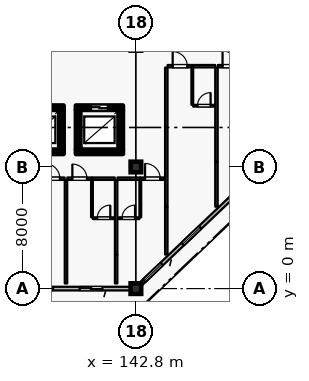
"""IFC4 building model, lengths in metres.
Left out: names, types, materials, properties, quantities, classifications, styles, units other than length and angle.
Written with IfcOpenShell. Run it as: python <this file> out.ifc"""

import sys

from ifc_helpers import new_model, si_unit, direction, frame, frame_2d, origin, origin_2d, place, context, subcontext, project, spatial, rectangle, extrude, element, fill, save


model = new_model("IFC4")
c1 = context("Model", 3, precision=1e-05, world=origin(), true_north=direction((0.0, 1.0)))
c2 = subcontext(c1, "Body", "Model", "MODEL_VIEW")
j1 = project(units=[si_unit("LENGTHUNIT", "METRE"), si_unit("PLANEANGLEUNIT", "RADIAN")], contexts=[c1])
p1 = place(None, origin())
s1 = spatial("IfcSite", under=j1, at=p1, CompositionType="ELEMENT")
p2 = place(p1, origin())
s2 = spatial("IfcBuilding", under=s1, at=p2, CompositionType="ELEMENT")
p3 = place(p2, frame((0.0, 0.0, 28.8)))
s3 = spatial("IfcBuildingStorey", under=s2, at=p3, CompositionType="ELEMENT", Elevation=28.8)
for number, where, z_axis, x_axis in (
    (1, (142.8, 0.0, 0.0), (0.0, 0.0, 1.0), (1.0, 0.0, 0.0)),
    (2, (142.8, 8.0, 0.0), (0.0, 0.0, 1.0), (1.0, 0.0, 0.0)),
):
    element("IfcColumn", number, at=place(p3, frame(where, z_axis=z_axis, x_axis=x_axis)), inside=s3, PredefinedType="COLUMN", context=c2, shape_type="SweptSolid", body=[
        extrude(rectangle(XDim=0.7, YDim=0.7, at=origin_2d()), origin(), (0.0, 0.0, 1.0), 3.6),
    ])
p4 = place(p3, frame((142.45, 0.0, 0.0), z_axis=(0.0, 0.0, 1.0), x_axis=(-1.0, 0.0, 0.0)))
e3 = element("IfcWall", 3, at=p4, inside=s3, PredefinedType="SOLIDWALL", context=c2, shape_type="SweptSolid", body=[
    extrude(rectangle(XDim=7.7, YDim=0.24, at=frame_2d((3.85, 0.0))), origin(), (0.0, 0.0, 1.0), 2.93),
])
p5 = place(p4, frame((1.85, 0.0, 0.0)))
e4 = element("IfcOpeningElement", 4, at=p5, cuts=e3, PredefinedType="OPENING", context=c2, shape_type="SweptSolid", body=[
    extrude(rectangle(XDim=1.5, YDim=2.25, at=frame_2d((0.75, 1.125))), frame((0.0, 0.13, 0.0), z_axis=(0.0, -1.0, 0.0), x_axis=(1.0, 0.0, 0.0)), (0.0, 0.0, 1.0), 0.26),
])
p6 = place(p4, frame((5.1, 0.0, 0.8)))
e5 = element("IfcOpeningElement", 5, at=p6, cuts=e3, PredefinedType="OPENING", context=c2, shape_type="SweptSolid", body=[
    extrude(rectangle(XDim=1.6, YDim=1.6, at=frame_2d((0.8, 0.8))), frame((0.0, 0.13, 0.0), z_axis=(0.0, -1.0, 0.0), x_axis=(1.0, 0.0, 0.0)), (0.0, 0.0, 1.0), 0.26),
])
p7 = place(p3, frame((150.85, 7.667, 0.0), z_axis=(0.0, 0.0, 1.0), x_axis=(-0.724116091282, -0.689678103427, 0.0)))
e6 = element("IfcWall", 6, at=p7, inside=s3, PredefinedType="SOLIDWALL", context=c2, shape_type="SweptSolid", body=[
    extrude(rectangle(XDim=10.634, YDim=0.24, at=frame_2d((5.317, 0.0))), origin(), (0.0, 0.0, 1.0), 2.93),
])
p8 = place(p7, frame((1.08, 0.0, 0.0)))
e7 = element("IfcOpeningElement", 7, at=p8, cuts=e6, PredefinedType="OPENING", context=c2, shape_type="SweptSolid", body=[
    extrude(rectangle(XDim=1.5, YDim=2.25, at=frame_2d((0.75, 1.125))), frame((0.0, 0.13, 0.0), z_axis=(0.0, -1.0, 0.0), x_axis=(1.0, 0.0, 0.0)), (0.0, 0.0, 1.0), 0.26),
])
p9 = place(p7, frame((5.276, 0.0, 0.8)))
e8 = element("IfcOpeningElement", 8, at=p9, cuts=e6, PredefinedType="OPENING", context=c2, shape_type="SweptSolid", body=[
    extrude(rectangle(XDim=1.6, YDim=1.6, at=frame_2d((0.8, 0.8))), frame((0.0, 0.13, 0.0), z_axis=(0.0, -1.0, 0.0), x_axis=(1.0, 0.0, 0.0)), (0.0, 0.0, 1.0), 0.26),
])
p10 = place(p7, frame((8.764, 0.0, 0.8)))
e9 = element("IfcOpeningElement", 9, at=p10, cuts=e6, PredefinedType="OPENING", context=c2, shape_type="SweptSolid", body=[
    extrude(rectangle(XDim=1.6, YDim=1.6, at=frame_2d((0.8, 0.8))), frame((0.0, 0.13, 0.0), z_axis=(0.0, -1.0, 0.0), x_axis=(1.0, 0.0, 0.0)), (0.0, 0.0, 1.0), 0.26),
])
p11 = place(p3, frame((134.95, 9.0, 0.0), z_axis=(0.0, 0.0, 1.0), x_axis=(1.0, 0.0, 0.0)))
e10 = element("IfcWall", 10, at=p11, inside=s3, PredefinedType="SHEAR", context=c2, shape_type="SweptSolid", body=[
    extrude(rectangle(XDim=3.1, YDim=0.3, at=frame_2d((1.55, 0.0))), origin(), (0.0, 0.0, 1.0), 3.365),
])
p12 = place(p3, frame((137.9, 9.155, 0.0), z_axis=(0.0, 0.0, 1.0), x_axis=(0.0, 1.0, 0.0)))
e11 = element("IfcWall", 11, at=p12, inside=s3, PredefinedType="SHEAR", context=c2, shape_type="SweptSolid", body=[
    extrude(rectangle(XDim=2.59, YDim=0.3, at=frame_2d((1.295, 0.0))), origin(), (0.0, 0.0, 1.0), 3.365),
])
p13 = place(p3, frame((138.05, 11.9, 0.0), z_axis=(0.0, 0.0, 1.0), x_axis=(-1.0, 0.0, 0.0)))
e12 = element("IfcWall", 12, at=p13, inside=s3, PredefinedType="SHEAR", context=c2, shape_type="SweptSolid", body=[
    extrude(rectangle(XDim=3.1, YDim=0.3, at=frame_2d((1.55, 0.0))), origin(), (0.0, 0.0, 1.0), 3.365),
])
p14 = place(p13, frame((1.0, 0.0, 0.0)))
e13 = element("IfcOpeningElement", 13, at=p14, cuts=e12, PredefinedType="OPENING", context=c2, shape_type="SweptSolid", body=[
    extrude(rectangle(XDim=1.1, YDim=2.2, at=frame_2d((0.55, 1.1))), frame((0.0, 0.16, 0.0), z_axis=(0.0, -1.0, 0.0), x_axis=(1.0, 0.0, 0.0)), (0.0, 0.0, 1.0), 0.32),
])
p15 = place(p3, frame((138.85, 9.0, 0.0), z_axis=(0.0, 0.0, 1.0), x_axis=(1.0, 0.0, 0.0)))
e14 = element("IfcWall", 14, at=p15, inside=s3, PredefinedType="SHEAR", context=c2, shape_type="SweptSolid", body=[
    extrude(rectangle(XDim=3.1, YDim=0.3, at=frame_2d((1.55, 0.0))), origin(), (0.0, 0.0, 1.0), 3.365),
])
p16 = place(p3, frame((141.8, 9.155, 0.0), z_axis=(0.0, 0.0, 1.0), x_axis=(0.0, 1.0, 0.0)))
e15 = element("IfcWall", 15, at=p16, inside=s3, PredefinedType="SHEAR", context=c2, shape_type="SweptSolid", body=[
    extrude(rectangle(XDim=2.59, YDim=0.3, at=frame_2d((1.295, 0.0))), origin(), (0.0, 0.0, 1.0), 3.365),
])
p17 = place(p3, frame((141.95, 11.9, 0.0), z_axis=(0.0, 0.0, 1.0), x_axis=(-1.0, 0.0, 0.0)))
e16 = element("IfcWall", 16, at=p17, inside=s3, PredefinedType="SHEAR", context=c2, shape_type="SweptSolid", body=[
    extrude(rectangle(XDim=3.1, YDim=0.3, at=frame_2d((1.55, 0.0))), origin(), (0.0, 0.0, 1.0), 3.365),
])
p18 = place(p17, frame((1.0, 0.0, 0.0)))
e17 = element("IfcOpeningElement", 17, at=p18, cuts=e16, PredefinedType="OPENING", context=c2, shape_type="SweptSolid", body=[
    extrude(rectangle(XDim=1.1, YDim=2.2, at=frame_2d((0.55, 1.1))), frame((0.0, 0.16, 0.0), z_axis=(0.0, -1.0, 0.0), x_axis=(1.0, 0.0, 0.0)), (0.0, 0.0, 1.0), 0.32),
])
p19 = place(p3, frame((139.0, 11.745, 0.0), z_axis=(0.0, 0.0, 1.0), x_axis=(0.0, -1.0, 0.0)))
e18 = element("IfcWall", 18, at=p19, inside=s3, PredefinedType="SHEAR", context=c2, shape_type="SweptSolid", body=[
    extrude(rectangle(XDim=2.59, YDim=0.3, at=frame_2d((1.295, 0.0))), origin(), (0.0, 0.0, 1.0), 3.365),
])
p20 = place(p3, frame((136.49, 7.23, 0.0), z_axis=(0.0, 0.0, 1.0), x_axis=(1.0, 0.0, 0.0)))
e19 = element("IfcWall", 19, at=p20, inside=s3, PredefinedType="PARTITIONING", context=c2, shape_type="SweptSolid", body=[
    extrude(rectangle(XDim=1.62, YDim=0.16, at=frame_2d((0.81, 0.0))), origin(), (0.0, 0.0, 1.0), 3.365),
])
p21 = place(p20, frame((0.31, 0.0, 0.0)))
e20 = element("IfcOpeningElement", 20, at=p21, cuts=e19, PredefinedType="OPENING", context=c2, shape_type="SweptSolid", body=[
    extrude(rectangle(XDim=1.0, YDim=2.25, at=frame_2d((0.5, 1.125))), frame((0.0, 0.09, 0.0), z_axis=(0.0, -1.0, 0.0), x_axis=(1.0, 0.0, 0.0)), (0.0, 0.0, 1.0), 0.18),
])
p22 = place(p3, frame((138.29, 7.23, 0.0), z_axis=(0.0, 0.0, 1.0), x_axis=(1.0, 0.0, 0.0)))
e21 = element("IfcWall", 21, at=p22, inside=s3, PredefinedType="PARTITIONING", context=c2, shape_type="SweptSolid", body=[
    extrude(rectangle(XDim=1.62, YDim=0.16, at=frame_2d((0.81, 0.0))), origin(), (0.0, 0.0, 1.0), 3.365),
])
p23 = place(p22, frame((0.33, 0.0, 0.0)))
e22 = element("IfcOpeningElement", 22, at=p23, cuts=e21, PredefinedType="OPENING", context=c2, shape_type="SweptSolid", body=[
    extrude(rectangle(XDim=0.96, YDim=2.2, at=frame_2d((0.48, 1.1))), frame((0.0, 0.09, 0.0), z_axis=(0.0, -1.0, 0.0), x_axis=(1.0, 0.0, 0.0)), (0.0, 0.0, 1.0), 0.18),
])
p24 = place(p3, frame((139.92, 7.23, 0.0), z_axis=(0.0, 0.0, 1.0), x_axis=(1.0, 0.0, 0.0)))
e23 = element("IfcWall", 23, at=p24, inside=s3, PredefinedType="PARTITIONING", context=c2, shape_type="SweptSolid", body=[
    extrude(rectangle(XDim=1.49, YDim=0.16, at=frame_2d((0.745, 0.0))), origin(), (0.0, 0.0, 1.0), 3.365),
])
p25 = place(p3, frame((139.91, 4.69, 0.0), z_axis=(0.0, 0.0, 1.0), x_axis=(0.0, 1.0, 0.0)))
e24 = element("IfcWall", 24, at=p25, inside=s3, PredefinedType="PARTITIONING", context=c2, shape_type="SweptSolid", body=[
    extrude(rectangle(XDim=2.45, YDim=0.115, at=frame_2d((1.225, 0.0))), origin(), (0.0, 0.0, 1.0), 3.365),
])
p26 = place(p3, frame((139.97, 4.63, 0.0), z_axis=(0.0, 0.0, 1.0), x_axis=(1.0, 0.0, 0.0)))
e25 = element("IfcWall", 25, at=p26, inside=s3, PredefinedType="PARTITIONING", context=c2, shape_type="SweptSolid", body=[
    extrude(rectangle(XDim=1.43, YDim=0.115, at=frame_2d((0.715, 0.0))), origin(), (0.0, 0.0, 1.0), 3.365),
])
p27 = place(p26, frame((0.285, 0.0, 0.0)))
e26 = element("IfcOpeningElement", 26, at=p27, cuts=e25, PredefinedType="OPENING", context=c2, shape_type="SweptSolid", body=[
    extrude(rectangle(XDim=0.86, YDim=2.12, at=frame_2d((0.43, 1.06))), frame((0.0, 0.067, 0.0), z_axis=(0.0, -1.0, 0.0), x_axis=(1.0, 0.0, 0.0)), (0.0, 0.0, 1.0), 0.135),
])
p28 = place(p3, frame((138.2, 0.34, 0.0), z_axis=(0.0, 0.0, 1.0), x_axis=(0.0, 1.0, 0.0)))
e27 = element("IfcWall", 27, at=p28, inside=s3, PredefinedType="PARTITIONING", context=c2, shape_type="SweptSolid", body=[
    extrude(rectangle(XDim=6.8, YDim=0.16, at=frame_2d((3.4, 0.0))), origin(), (0.0, 0.0, 1.0), 3.365),
])
p29 = place(p3, frame((141.5, 0.34, 0.0), z_axis=(0.0, 0.0, 1.0), x_axis=(0.0, 1.0, 0.0)))
e28 = element("IfcWall", 28, at=p29, inside=s3, PredefinedType="PARTITIONING", context=c2, shape_type="SweptSolid", body=[
    extrude(rectangle(XDim=1.89, YDim=0.16, at=frame_2d((0.945, 0.0))), origin(), (0.0, 0.0, 1.0), 3.365),
])
p30 = place(p3, frame((141.59, 7.23, 0.0), z_axis=(0.0, 0.0, 1.0), x_axis=(1.0, 0.0, 0.0)))
e29 = element("IfcWall", 29, at=p30, inside=s3, PredefinedType="PARTITIONING", context=c2, shape_type="SweptSolid", body=[
    extrude(rectangle(XDim=1.49, YDim=0.16, at=frame_2d((0.745, 0.0))), origin(), (0.0, 0.0, 1.0), 3.365),
])
p31 = place(p3, frame((143.09, 7.23, 0.0), z_axis=(0.0, 0.0, 1.0), x_axis=(1.0, 0.0, 0.0)))
e30 = element("IfcWall", 30, at=p31, inside=s3, PredefinedType="PARTITIONING", context=c2, shape_type="SweptSolid", body=[
    extrude(rectangle(XDim=1.62, YDim=0.16, at=frame_2d((0.81, 0.0))), origin(), (0.0, 0.0, 1.0), 3.365),
])
p32 = place(p31, frame((0.31, 0.0, 0.0)))
e31 = element("IfcOpeningElement", 31, at=p32, cuts=e30, PredefinedType="OPENING", context=c2, shape_type="SweptSolid", body=[
    extrude(rectangle(XDim=1.0, YDim=2.25, at=frame_2d((0.5, 1.125))), frame((0.0, 0.09, 0.0), z_axis=(0.0, -1.0, 0.0), x_axis=(1.0, 0.0, 0.0)), (0.0, 0.0, 1.0), 0.18),
])
p33 = place(p3, frame((143.09, 4.69, 0.0), z_axis=(0.0, 0.0, 1.0), x_axis=(0.0, 1.0, 0.0)))
e32 = element("IfcWall", 32, at=p33, inside=s3, PredefinedType="PARTITIONING", context=c2, shape_type="SweptSolid", body=[
    extrude(rectangle(XDim=2.45, YDim=0.115, at=frame_2d((1.225, 0.0))), origin(), (0.0, 0.0, 1.0), 3.365),
])
p34 = place(p3, frame((141.6, 4.63, 0.0), z_axis=(0.0, 0.0, 1.0), x_axis=(1.0, 0.0, 0.0)))
e33 = element("IfcWall", 33, at=p34, inside=s3, PredefinedType="PARTITIONING", context=c2, shape_type="SweptSolid", body=[
    extrude(rectangle(XDim=1.43, YDim=0.115, at=frame_2d((0.715, 0.0))), origin(), (0.0, 0.0, 1.0), 3.365),
])
p35 = place(p34, frame((0.285, 0.0, 0.0)))
e34 = element("IfcOpeningElement", 34, at=p35, cuts=e33, PredefinedType="OPENING", context=c2, shape_type="SweptSolid", body=[
    extrude(rectangle(XDim=0.86, YDim=2.12, at=frame_2d((0.43, 1.06))), frame((0.0, 0.067, 0.0), z_axis=(0.0, -1.0, 0.0), x_axis=(1.0, 0.0, 0.0)), (0.0, 0.0, 1.0), 0.135),
])
p36 = place(p3, frame((141.5, 2.24, 0.0), z_axis=(0.0, 0.0, 1.0), x_axis=(0.0, 1.0, 0.0)))
e35 = element("IfcWall", 35, at=p36, inside=s3, PredefinedType="PARTITIONING", context=c2, shape_type="SweptSolid", body=[
    extrude(rectangle(XDim=4.9, YDim=0.16, at=frame_2d((2.45, 0.0))), origin(), (0.0, 0.0, 1.0), 3.365),
])
p37 = place(p3, frame((144.8, 2.24, 0.0), z_axis=(0.0, 0.0, 1.0), x_axis=(0.0, 1.0, 0.0)))
e36 = element("IfcWall", 36, at=p37, inside=s3, PredefinedType="PARTITIONING", context=c2, shape_type="SweptSolid", body=[
    extrude(rectangle(XDim=3.14, YDim=0.16, at=frame_2d((1.57, 0.0))), origin(), (0.0, 0.0, 1.0), 3.365),
])
p38 = place(p3, frame((144.89, 14.63, 0.0), z_axis=(0.0, 0.0, 1.0), x_axis=(1.0, 0.0, 0.0)))
e37 = element("IfcWall", 37, at=p38, inside=s3, PredefinedType="PARTITIONING", context=c2, shape_type="SweptSolid", body=[
    extrude(rectangle(XDim=1.62, YDim=0.16, at=frame_2d((0.81, 0.0))), origin(), (0.0, 0.0, 1.0), 3.365),
])
p39 = place(p38, frame((0.33, 0.0, 0.0)))
e38 = element("IfcOpeningElement", 38, at=p39, cuts=e37, PredefinedType="OPENING", context=c2, shape_type="SweptSolid", body=[
    extrude(rectangle(XDim=0.96, YDim=2.2, at=frame_2d((0.48, 1.1))), frame((0.0, 0.09, 0.0), z_axis=(0.0, -1.0, 0.0), x_axis=(1.0, 0.0, 0.0)), (0.0, 0.0, 1.0), 0.18),
])
p40 = place(p3, frame((146.52, 14.63, 0.0), z_axis=(0.0, 0.0, 1.0), x_axis=(1.0, 0.0, 0.0)))
e39 = element("IfcWall", 39, at=p40, inside=s3, PredefinedType="PARTITIONING", context=c2, shape_type="SweptSolid", body=[
    extrude(rectangle(XDim=1.49, YDim=0.16, at=frame_2d((0.745, 0.0))), origin(), (0.0, 0.0, 1.0), 3.365),
])
p41 = place(p3, frame((146.51, 12.09, 0.0), z_axis=(0.0, 0.0, 1.0), x_axis=(0.0, 1.0, 0.0)))
e40 = element("IfcWall", 40, at=p41, inside=s3, PredefinedType="PARTITIONING", context=c2, shape_type="SweptSolid", body=[
    extrude(rectangle(XDim=2.45, YDim=0.115, at=frame_2d((1.225, 0.0))), origin(), (0.0, 0.0, 1.0), 3.365),
])
p42 = place(p3, frame((146.57, 12.03, 0.0), z_axis=(0.0, 0.0, 1.0), x_axis=(1.0, 0.0, 0.0)))
e41 = element("IfcWall", 41, at=p42, inside=s3, PredefinedType="PARTITIONING", context=c2, shape_type="SweptSolid", body=[
    extrude(rectangle(XDim=1.43, YDim=0.115, at=frame_2d((0.715, 0.0))), origin(), (0.0, 0.0, 1.0), 3.365),
])
p43 = place(p42, frame((0.285, 0.0, 0.0)))
e42 = element("IfcOpeningElement", 42, at=p43, cuts=e41, PredefinedType="OPENING", context=c2, shape_type="SweptSolid", body=[
    extrude(rectangle(XDim=0.86, YDim=2.12, at=frame_2d((0.43, 1.06))), frame((0.0, 0.067, 0.0), z_axis=(0.0, -1.0, 0.0), x_axis=(1.0, 0.0, 0.0)), (0.0, 0.0, 1.0), 0.135),
])
p44 = place(p3, frame((144.8, 5.39, 0.0), z_axis=(0.0, 0.0, 1.0), x_axis=(0.0, 1.0, 0.0)))
e43 = element("IfcWall", 43, at=p44, inside=s3, PredefinedType="PARTITIONING", context=c2, shape_type="SweptSolid", body=[
    extrude(rectangle(XDim=9.15, YDim=0.16, at=frame_2d((4.575, 0.0))), origin(), (0.0, 0.0, 1.0), 3.365),
])
p45 = place(p3, frame((148.1, 5.39, 0.0), z_axis=(0.0, 0.0, 1.0), x_axis=(0.0, 1.0, 0.0)))
e44 = element("IfcWall", 44, at=p45, inside=s3, PredefinedType="PARTITIONING", context=c2, shape_type="SweptSolid", body=[
    extrude(rectangle(XDim=2.94, YDim=0.16, at=frame_2d((1.47, 0.0))), origin(), (0.0, 0.0, 1.0), 3.365),
])
p46 = place(p3, frame((148.19, 14.63, 0.0), z_axis=(0.0, 0.0, 1.0), x_axis=(1.0, 0.0, 0.0)))
e45 = element("IfcWall", 45, at=p46, inside=s3, PredefinedType="PARTITIONING", context=c2, shape_type="SweptSolid", body=[
    extrude(rectangle(XDim=1.62, YDim=0.16, at=frame_2d((0.81, 0.0))), origin(), (0.0, 0.0, 1.0), 3.365),
])
p47 = place(p46, frame((0.31, 0.0, 0.0)))
e46 = element("IfcOpeningElement", 46, at=p47, cuts=e45, PredefinedType="OPENING", context=c2, shape_type="SweptSolid", body=[
    extrude(rectangle(XDim=1.0, YDim=2.25, at=frame_2d((0.5, 1.125))), frame((0.0, 0.09, 0.0), z_axis=(0.0, -1.0, 0.0), x_axis=(1.0, 0.0, 0.0)), (0.0, 0.0, 1.0), 0.18),
])
p48 = place(p3, frame((148.1, 8.34, 0.0), z_axis=(0.0, 0.0, 1.0), x_axis=(0.0, 1.0, 0.0)))
e47 = element("IfcWall", 47, at=p48, inside=s3, PredefinedType="PARTITIONING", context=c2, shape_type="SweptSolid", body=[
    extrude(rectangle(XDim=6.2, YDim=0.16, at=frame_2d((3.1, 0.0))), origin(), (0.0, 0.0, 1.0), 3.365),
])
p49 = place(p5, origin())
e48 = element("IfcDoor", 48, at=p49, inside=s3, OperationType="SLIDING_TO_LEFT", PredefinedType="DOOR", context=c2, shape_type="SweptSolid", body=[
    extrude(rectangle(XDim=1.5, YDim=2.25, at=frame_2d((0.75, 1.125))), frame((0.0, 0.025, 0.0), z_axis=(0.0, -1.0, 0.0), x_axis=(1.0, 0.0, 0.0)), (0.0, 0.0, 1.0), 0.05),
])
fill(e4, e48)
p50 = place(p6, origin())
e49 = element("IfcWindow", 49, at=p50, inside=s3, PartitioningType="SINGLE_PANEL", PredefinedType="WINDOW", context=c2, shape_type="SweptSolid", body=[
    extrude(rectangle(XDim=1.6, YDim=1.6, at=frame_2d((0.8, 0.8))), frame((0.0, 0.03, 0.0), z_axis=(0.0, -1.0, 0.0), x_axis=(1.0, 0.0, 0.0)), (0.0, 0.0, 1.0), 0.06),
])
fill(e5, e49)
p51 = place(p8, origin())
e50 = element("IfcDoor", 50, at=p51, inside=s3, OperationType="SLIDING_TO_LEFT", PredefinedType="DOOR", context=c2, shape_type="SweptSolid", body=[
    extrude(rectangle(XDim=1.5, YDim=2.25, at=frame_2d((0.75, 1.125))), frame((0.0, 0.025, 0.0), z_axis=(0.0, -1.0, 0.0), x_axis=(1.0, 0.0, 0.0)), (0.0, 0.0, 1.0), 0.05),
])
fill(e7, e50)
p52 = place(p9, origin())
e51 = element("IfcWindow", 51, at=p52, inside=s3, PartitioningType="SINGLE_PANEL", PredefinedType="WINDOW", context=c2, shape_type="SweptSolid", body=[
    extrude(rectangle(XDim=1.6, YDim=1.6, at=frame_2d((0.8, 0.8))), frame((0.0, 0.03, 0.0), z_axis=(0.0, -1.0, 0.0), x_axis=(1.0, 0.0, 0.0)), (0.0, 0.0, 1.0), 0.06),
])
fill(e8, e51)
p53 = place(p10, origin())
e52 = element("IfcWindow", 52, at=p53, inside=s3, PartitioningType="SINGLE_PANEL", PredefinedType="WINDOW", context=c2, shape_type="SweptSolid", body=[
    extrude(rectangle(XDim=1.6, YDim=1.6, at=frame_2d((0.8, 0.8))), frame((0.0, 0.03, 0.0), z_axis=(0.0, -1.0, 0.0), x_axis=(1.0, 0.0, 0.0)), (0.0, 0.0, 1.0), 0.06),
])
fill(e9, e52)
p54 = place(p18, origin())
e53 = element("IfcDoor", 53, at=p54, inside=s3, OperationType="DOUBLE_DOOR_SLIDING", PredefinedType="DOOR", context=c2, shape_type="SweptSolid", body=[
    extrude(rectangle(XDim=1.1, YDim=2.2, at=frame_2d((0.55, 1.1))), frame((0.0, 0.025, 0.0), z_axis=(0.0, -1.0, 0.0), x_axis=(1.0, 0.0, 0.0)), (0.0, 0.0, 1.0), 0.05),
])
fill(e17, e53)
p55 = place(p21, origin())
e54 = element("IfcDoor", 54, at=p55, inside=s3, OperationType="SINGLE_SWING_LEFT", PredefinedType="DOOR", context=c2, shape_type="SweptSolid", body=[
    extrude(rectangle(XDim=1.0, YDim=2.25, at=frame_2d((0.5, 1.125))), frame((0.0, 0.025, 0.0), z_axis=(0.0, -1.0, 0.0), x_axis=(1.0, 0.0, 0.0)), (0.0, 0.0, 1.0), 0.05),
])
fill(e20, e54)
p56 = place(p23, origin())
e55 = element("IfcDoor", 55, at=p56, inside=s3, OperationType="SINGLE_SWING_LEFT", PredefinedType="DOOR", context=c2, shape_type="SweptSolid", body=[
    extrude(rectangle(XDim=0.96, YDim=2.2, at=frame_2d((0.48, 1.1))), frame((0.0, 0.025, 0.0), z_axis=(0.0, -1.0, 0.0), x_axis=(1.0, 0.0, 0.0)), (0.0, 0.0, 1.0), 0.05),
])
fill(e22, e55)
p57 = place(p27, origin())
e56 = element("IfcDoor", 56, at=p57, inside=s3, OperationType="SINGLE_SWING_RIGHT", PredefinedType="DOOR", context=c2, shape_type="SweptSolid", body=[
    extrude(rectangle(XDim=0.86, YDim=2.12, at=frame_2d((0.43, 1.06))), frame((0.0, 0.025, 0.0), z_axis=(0.0, -1.0, 0.0), x_axis=(1.0, 0.0, 0.0)), (0.0, 0.0, 1.0), 0.05),
])
fill(e26, e56)
p58 = place(p32, origin())
e57 = element("IfcDoor", 57, at=p58, inside=s3, OperationType="SINGLE_SWING_LEFT", PredefinedType="DOOR", context=c2, shape_type="SweptSolid", body=[
    extrude(rectangle(XDim=1.0, YDim=2.25, at=frame_2d((0.5, 1.125))), frame((0.0, 0.025, 0.0), z_axis=(0.0, -1.0, 0.0), x_axis=(1.0, 0.0, 0.0)), (0.0, 0.0, 1.0), 0.05),
])
fill(e31, e57)
p59 = place(p35, origin())
e58 = element("IfcDoor", 58, at=p59, inside=s3, OperationType="SINGLE_SWING_RIGHT", PredefinedType="DOOR", context=c2, shape_type="SweptSolid", body=[
    extrude(rectangle(XDim=0.86, YDim=2.12, at=frame_2d((0.43, 1.06))), frame((0.0, 0.025, 0.0), z_axis=(0.0, -1.0, 0.0), x_axis=(1.0, 0.0, 0.0)), (0.0, 0.0, 1.0), 0.05),
])
fill(e34, e58)
p60 = place(p39, origin())
e59 = element("IfcDoor", 59, at=p60, inside=s3, OperationType="SINGLE_SWING_LEFT", PredefinedType="DOOR", context=c2, shape_type="SweptSolid", body=[
    extrude(rectangle(XDim=0.96, YDim=2.2, at=frame_2d((0.48, 1.1))), frame((0.0, 0.025, 0.0), z_axis=(0.0, -1.0, 0.0), x_axis=(1.0, 0.0, 0.0)), (0.0, 0.0, 1.0), 0.05),
])
fill(e38, e59)
p61 = place(p43, origin())
e60 = element("IfcDoor", 60, at=p61, inside=s3, OperationType="SINGLE_SWING_RIGHT", PredefinedType="DOOR", context=c2, shape_type="SweptSolid", body=[
    extrude(rectangle(XDim=0.86, YDim=2.12, at=frame_2d((0.43, 1.06))), frame((0.0, 0.025, 0.0), z_axis=(0.0, -1.0, 0.0), x_axis=(1.0, 0.0, 0.0)), (0.0, 0.0, 1.0), 0.05),
])
fill(e42, e60)
p62 = place(p47, origin())
e61 = element("IfcDoor", 61, at=p62, inside=s3, OperationType="SINGLE_SWING_LEFT", PredefinedType="DOOR", context=c2, shape_type="SweptSolid", body=[
    extrude(rectangle(XDim=1.0, YDim=2.25, at=frame_2d((0.5, 1.125))), frame((0.0, 0.025, 0.0), z_axis=(0.0, -1.0, 0.0), x_axis=(1.0, 0.0, 0.0)), (0.0, 0.0, 1.0), 0.05),
])
fill(e46, e61)
save(model, sys.argv[1])
